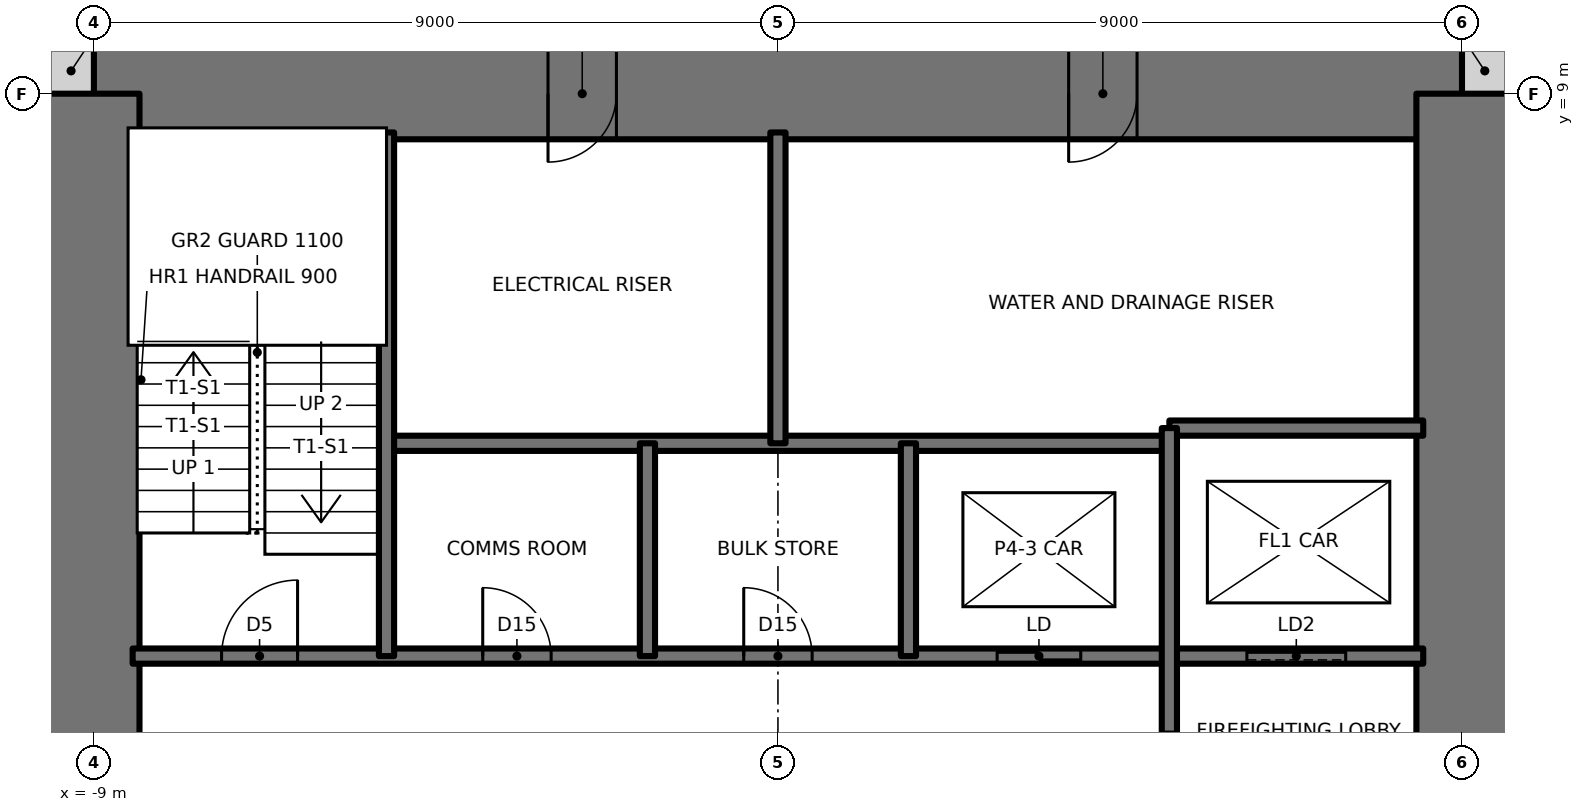
"""IFC4 building model, lengths in metres.
Left out: names, types, materials, properties, quantities, classifications, styles, units other than length and angle.
Written with IfcOpenShell. Run it as: python <this file> out.ifc"""

import sys

from ifc_helpers import new_model, si_unit, direction, frame, frame_2d, origin, place, context, subcontext, project, spatial, rectangle, extrude, element, fill, save


model = new_model("IFC4")
c1 = context("Model", 3, precision=1e-05, world=origin(), true_north=direction((0.0, 1.0)))
c2 = subcontext(c1, "Body", "Model", "MODEL_VIEW")
j1 = project(units=[si_unit("LENGTHUNIT", "METRE"), si_unit("PLANEANGLEUNIT", "RADIAN")], contexts=[c1])
p1 = place(None, origin())
s1 = spatial("IfcSite", under=j1, at=p1, CompositionType="ELEMENT")
p2 = place(p1, origin())
s2 = spatial("IfcBuilding", under=s1, at=p2, CompositionType="ELEMENT")
p3 = place(p2, frame((0.0, 0.0, 232.5)))
s3 = spatial("IfcBuildingStorey", under=s2, at=p3, CompositionType="ELEMENT", Elevation=232.5)
for number, where, z_axis, x_axis in (
    (1, (9.0, 9.3, 0.0), (0.0, 0.0, 1.0), (1.0, 0.0, 0.0)),
    (2, (-9.6, 9.3, 0.0), (0.0, 0.0, 1.0), (1.0, 0.0, 0.0)),
):
    element("IfcWall", number, at=place(p3, frame(where, z_axis=z_axis, x_axis=x_axis)), inside=s3, PredefinedType="SOLIDWALL", context=c2, shape_type="SweptSolid", body=[
        extrude(rectangle(XDim=0.6, YDim=0.6, at=frame_2d((0.3, 0.0))), origin(), (0.0, 0.0, 1.0), 3.5),
    ])
p4 = place(p3, frame((9.0, 9.0, 0.0), z_axis=(0.0, 0.0, 1.0), x_axis=(-1.0, 0.0, 0.0)))
e3 = element("IfcWall", 3, at=p4, inside=s3, PredefinedType="SHEAR", context=c2, shape_type="SweptSolid", body=[
    extrude(rectangle(XDim=18.0, YDim=1.2, at=frame_2d((9.0, 0.0))), origin(), (0.0, 0.0, 1.0), 3.5),
])
p5 = place(p4, frame((11.125, 0.0, 0.0)))
e4 = element("IfcOpeningElement", 4, at=p5, cuts=e3, PredefinedType="OPENING", context=c2, shape_type="SweptSolid", body=[
    extrude(rectangle(XDim=0.9, YDim=2.1, at=frame_2d((0.45, 1.05))), frame((0.0, 0.61, 0.0), z_axis=(0.0, -1.0, 0.0), x_axis=(1.0, 0.0, 0.0)), (0.0, 0.0, 1.0), 1.22),
])
p6 = place(p4, frame((4.275, 0.0, 0.0)))
e5 = element("IfcOpeningElement", 5, at=p6, cuts=e3, PredefinedType="OPENING", context=c2, shape_type="SweptSolid", body=[
    extrude(rectangle(XDim=0.9, YDim=2.1, at=frame_2d((0.45, 1.05))), frame((0.0, 0.61, 0.0), z_axis=(0.0, -1.0, 0.0), x_axis=(1.0, 0.0, 0.0)), (0.0, 0.0, 1.0), 1.22),
])
p7 = place(p3, frame((9.0, -9.0, 0.0), z_axis=(0.0, 0.0, 1.0), x_axis=(0.0, 1.0, 0.0)))
e6 = element("IfcWall", 6, at=p7, inside=s3, PredefinedType="SHEAR", context=c2, shape_type="SweptSolid", body=[
    extrude(rectangle(XDim=18.0, YDim=1.2, at=frame_2d((9.0, 0.0))), origin(), (0.0, 0.0, 1.0), 3.5),
])
p8 = place(p7, frame((8.5, 0.0, 0.0)))
e7 = element("IfcOpeningElement", 7, at=p8, cuts=e6, PredefinedType="OPENING", context=c2, shape_type="SweptSolid", body=[
    extrude(rectangle(XDim=1.0, YDim=2.1, at=frame_2d((0.5, 1.05))), frame((0.0, 0.61, 0.0), z_axis=(0.0, -1.0, 0.0), x_axis=(1.0, 0.0, 0.0)), (0.0, 0.0, 1.0), 1.22),
])
p9 = place(p3, frame((-9.0, 9.0, 0.0), z_axis=(0.0, 0.0, 1.0), x_axis=(0.0, -1.0, 0.0)))
e8 = element("IfcWall", 8, at=p9, inside=s3, PredefinedType="SHEAR", context=c2, shape_type="SweptSolid", body=[
    extrude(rectangle(XDim=18.0, YDim=1.2, at=frame_2d((9.0, 0.0))), origin(), (0.0, 0.0, 1.0), 3.5),
])
p10 = place(p9, frame((8.5, 0.0, 0.0)))
e9 = element("IfcOpeningElement", 9, at=p10, cuts=e8, PredefinedType="OPENING", context=c2, shape_type="SweptSolid", body=[
    extrude(rectangle(XDim=1.0, YDim=2.1, at=frame_2d((0.5, 1.05))), frame((0.0, 0.61, 0.0), z_axis=(0.0, -1.0, 0.0), x_axis=(1.0, 0.0, 0.0)), (0.0, 0.0, 1.0), 1.22),
])
p11 = place(p3, frame((-8.49, 1.6, 0.0), z_axis=(0.0, 0.0, 1.0), x_axis=(1.0, 0.0, 0.0)))
e10 = element("IfcWall", 10, at=p11, inside=s3, PredefinedType="SOLIDWALL", context=c2, shape_type="SweptSolid", body=[
    extrude(rectangle(XDim=16.98, YDim=0.2, at=frame_2d((8.49, 0.0))), origin(), (0.0, 0.0, 1.0), 3.5),
])
p12 = place(p11, frame((1.17, 0.0, 0.0)))
e11 = element("IfcOpeningElement", 11, at=p12, cuts=e10, PredefinedType="OPENING", context=c2, shape_type="SweptSolid", body=[
    extrude(rectangle(XDim=1.0, YDim=2.1, at=frame_2d((0.5, 1.05))), frame((0.0, 0.11, 0.0), z_axis=(0.0, -1.0, 0.0), x_axis=(1.0, 0.0, 0.0)), (0.0, 0.0, 1.0), 0.22),
])
p13 = place(p11, frame((4.606, 0.0, 0.0)))
e12 = element("IfcOpeningElement", 12, at=p13, cuts=e10, PredefinedType="OPENING", context=c2, shape_type="SweptSolid", body=[
    extrude(rectangle(XDim=0.9, YDim=2.1, at=frame_2d((0.45, 1.05))), frame((0.0, 0.11, 0.0), z_axis=(0.0, -1.0, 0.0), x_axis=(1.0, 0.0, 0.0)), (0.0, 0.0, 1.0), 0.22),
])
p14 = place(p11, frame((8.04, 0.0, 0.0)))
e13 = element("IfcOpeningElement", 13, at=p14, cuts=e10, PredefinedType="OPENING", context=c2, shape_type="SweptSolid", body=[
    extrude(rectangle(XDim=0.9, YDim=2.1, at=frame_2d((0.45, 1.05))), frame((0.0, 0.11, 0.0), z_axis=(0.0, -1.0, 0.0), x_axis=(1.0, 0.0, 0.0)), (0.0, 0.0, 1.0), 0.22),
])
p15 = place(p11, frame((11.374, 0.0, 0.0)))
e14 = element("IfcOpeningElement", 14, at=p15, cuts=e10, PredefinedType="OPENING", context=c2, shape_type="SweptSolid", body=[
    extrude(rectangle(XDim=1.1, YDim=2.1, at=frame_2d((0.55, 1.05))), frame((0.0, 0.11, 0.0), z_axis=(0.0, -1.0, 0.0), x_axis=(1.0, 0.0, 0.0)), (0.0, 0.0, 1.0), 0.22),
])
p16 = place(p11, frame((14.66, 0.0, 0.0)))
e15 = element("IfcOpeningElement", 15, at=p16, cuts=e10, PredefinedType="OPENING", context=c2, shape_type="SweptSolid", body=[
    extrude(rectangle(XDim=1.3, YDim=2.1, at=frame_2d((0.65, 1.05))), frame((0.0, 0.11, 0.0), z_axis=(0.0, -1.0, 0.0), x_axis=(1.0, 0.0, 0.0)), (0.0, 0.0, 1.0), 0.22),
])
p17 = place(p3, frame((-5.15, 4.4, 0.0), z_axis=(0.0, 0.0, 1.0), x_axis=(1.0, 0.0, 0.0)))
e16 = element("IfcWall", 16, at=p17, inside=s3, PredefinedType="SOLIDWALL", context=c2, shape_type="SweptSolid", body=[
    extrude(rectangle(XDim=10.3, YDim=0.2, at=frame_2d((5.15, 0.0))), origin(), (0.0, 0.0, 1.0), 3.5),
])
p18 = place(p3, frame((5.15, 4.6, 0.0), z_axis=(0.0, 0.0, 1.0), x_axis=(1.0, 0.0, 0.0)))
e17 = element("IfcWall", 17, at=p18, inside=s3, PredefinedType="SOLIDWALL", context=c2, shape_type="SweptSolid", body=[
    extrude(rectangle(XDim=3.34, YDim=0.2, at=frame_2d((1.67, 0.0))), origin(), (0.0, 0.0, 1.0), 3.5),
])
p19 = place(p3, frame((5.15, -8.49, 0.0), z_axis=(0.0, 0.0, 1.0), x_axis=(0.0, 1.0, 0.0)))
e18 = element("IfcWall", 18, at=p19, inside=s3, PredefinedType="SOLIDWALL", context=c2, shape_type="SweptSolid", body=[
    extrude(rectangle(XDim=13.09, YDim=0.2, at=frame_2d((6.545, 0.0))), origin(), (0.0, 0.0, 1.0), 3.5),
])
p20 = place(p19, frame((7.89, 0.0, 0.0)))
e19 = element("IfcOpeningElement", 19, at=p20, cuts=e18, PredefinedType="OPENING", context=c2, shape_type="SweptSolid", body=[
    extrude(rectangle(XDim=1.2, YDim=2.1, at=frame_2d((0.6, 1.05))), frame((0.0, 0.11, 0.0), z_axis=(0.0, -1.0, 0.0), x_axis=(1.0, 0.0, 0.0)), (0.0, 0.0, 1.0), 0.22),
])
p21 = place(p3, frame((1.717, 1.6, 0.0), z_axis=(0.0, 0.0, 1.0), x_axis=(0.0, 1.0, 0.0)))
e20 = element("IfcWall", 20, at=p21, inside=s3, PredefinedType="SOLIDWALL", context=c2, shape_type="SweptSolid", body=[
    extrude(rectangle(XDim=2.8, YDim=0.2, at=frame_2d((1.4, 0.0))), origin(), (0.0, 0.0, 1.0), 3.5),
])
p22 = place(p3, frame((0.0, 4.4, 0.0), z_axis=(0.0, 0.0, 1.0), x_axis=(0.0, 1.0, 0.0)))
e21 = element("IfcWall", 21, at=p22, inside=s3, PredefinedType="SOLIDWALL", context=c2, shape_type="SweptSolid", body=[
    extrude(rectangle(XDim=4.09, YDim=0.2, at=frame_2d((2.045, 0.0))), origin(), (0.0, 0.0, 1.0), 3.5),
])
p23 = place(p3, frame((-1.717, 1.6, 0.0), z_axis=(0.0, 0.0, 1.0), x_axis=(0.0, 1.0, 0.0)))
e22 = element("IfcWall", 22, at=p23, inside=s3, PredefinedType="SOLIDWALL", context=c2, shape_type="SweptSolid", body=[
    extrude(rectangle(XDim=2.8, YDim=0.2, at=frame_2d((1.4, 0.0))), origin(), (0.0, 0.0, 1.0), 3.5),
])
p24 = place(p3, frame((-5.15, 1.6, 0.0), z_axis=(0.0, 0.0, 1.0), x_axis=(0.0, 1.0, 0.0)))
e23 = element("IfcWall", 23, at=p24, inside=s3, PredefinedType="SOLIDWALL", context=c2, shape_type="SweptSolid", body=[
    extrude(rectangle(XDim=6.89, YDim=0.2, at=frame_2d((3.445, 0.0))), origin(), (0.0, 0.0, 1.0), 3.5),
])
p25 = place(p12, origin())
e24 = element("IfcDoor", 24, at=p25, inside=s3, OperationType="SINGLE_SWING_RIGHT", PredefinedType="DOOR", context=c2, shape_type="SweptSolid", body=[
    extrude(rectangle(XDim=1.0, YDim=2.1, at=frame_2d((0.5, 1.05))), frame((0.0, 0.025, 0.0), z_axis=(0.0, -1.0, 0.0), x_axis=(1.0, 0.0, 0.0)), (0.0, 0.0, 1.0), 0.05),
])
fill(e11, e24)
p26 = place(p13, origin())
e25 = element("IfcDoor", 25, at=p26, inside=s3, OperationType="SINGLE_SWING_LEFT", PredefinedType="DOOR", context=c2, shape_type="SweptSolid", body=[
    extrude(rectangle(XDim=0.9, YDim=2.1, at=frame_2d((0.45, 1.05))), frame((0.0, 0.025, 0.0), z_axis=(0.0, -1.0, 0.0), x_axis=(1.0, 0.0, 0.0)), (0.0, 0.0, 1.0), 0.05),
])
fill(e12, e25)
p27 = place(p14, origin())
e26 = element("IfcDoor", 26, at=p27, inside=s3, OperationType="SINGLE_SWING_LEFT", PredefinedType="DOOR", context=c2, shape_type="SweptSolid", body=[
    extrude(rectangle(XDim=0.9, YDim=2.1, at=frame_2d((0.45, 1.05))), frame((0.0, 0.025, 0.0), z_axis=(0.0, -1.0, 0.0), x_axis=(1.0, 0.0, 0.0)), (0.0, 0.0, 1.0), 0.05),
])
fill(e13, e26)
p28 = place(p5, origin())
e27 = element("IfcDoor", 27, at=p28, inside=s3, OperationType="SINGLE_SWING_RIGHT", PredefinedType="DOOR", context=c2, shape_type="SweptSolid", body=[
    extrude(rectangle(XDim=0.9, YDim=2.1, at=frame_2d((0.45, 1.05))), frame((0.0, 0.025, 0.0), z_axis=(0.0, -1.0, 0.0), x_axis=(1.0, 0.0, 0.0)), (0.0, 0.0, 1.0), 0.05),
])
fill(e4, e27)
p29 = place(p6, origin())
e28 = element("IfcDoor", 28, at=p29, inside=s3, OperationType="SINGLE_SWING_RIGHT", PredefinedType="DOOR", context=c2, shape_type="SweptSolid", body=[
    extrude(rectangle(XDim=0.9, YDim=2.1, at=frame_2d((0.45, 1.05))), frame((0.0, 0.025, 0.0), z_axis=(0.0, -1.0, 0.0), x_axis=(1.0, 0.0, 0.0)), (0.0, 0.0, 1.0), 0.05),
])
fill(e5, e28)
p30 = place(p15, origin())
e29 = element("IfcDoor", 29, at=p30, inside=s3, OperationType="DOUBLE_DOOR_SLIDING", PredefinedType="DOOR", context=c2, shape_type="SweptSolid", body=[
    extrude(rectangle(XDim=1.1, YDim=2.1, at=frame_2d((0.55, 1.05))), frame((0.0, 0.025, 0.0), z_axis=(0.0, -1.0, 0.0), x_axis=(1.0, 0.0, 0.0)), (0.0, 0.0, 1.0), 0.05),
])
fill(e14, e29)
p31 = place(p16, origin())
e30 = element("IfcDoor", 30, at=p31, inside=s3, OperationType="SLIDING_TO_LEFT", PredefinedType="DOOR", context=c2, shape_type="SweptSolid", body=[
    extrude(rectangle(XDim=1.3, YDim=2.1, at=frame_2d((0.65, 1.05))), frame((0.0, 0.025, 0.0), z_axis=(0.0, -1.0, 0.0), x_axis=(1.0, 0.0, 0.0)), (0.0, 0.0, 1.0), 0.05),
])
fill(e15, e30)
save(model, sys.argv[1])
